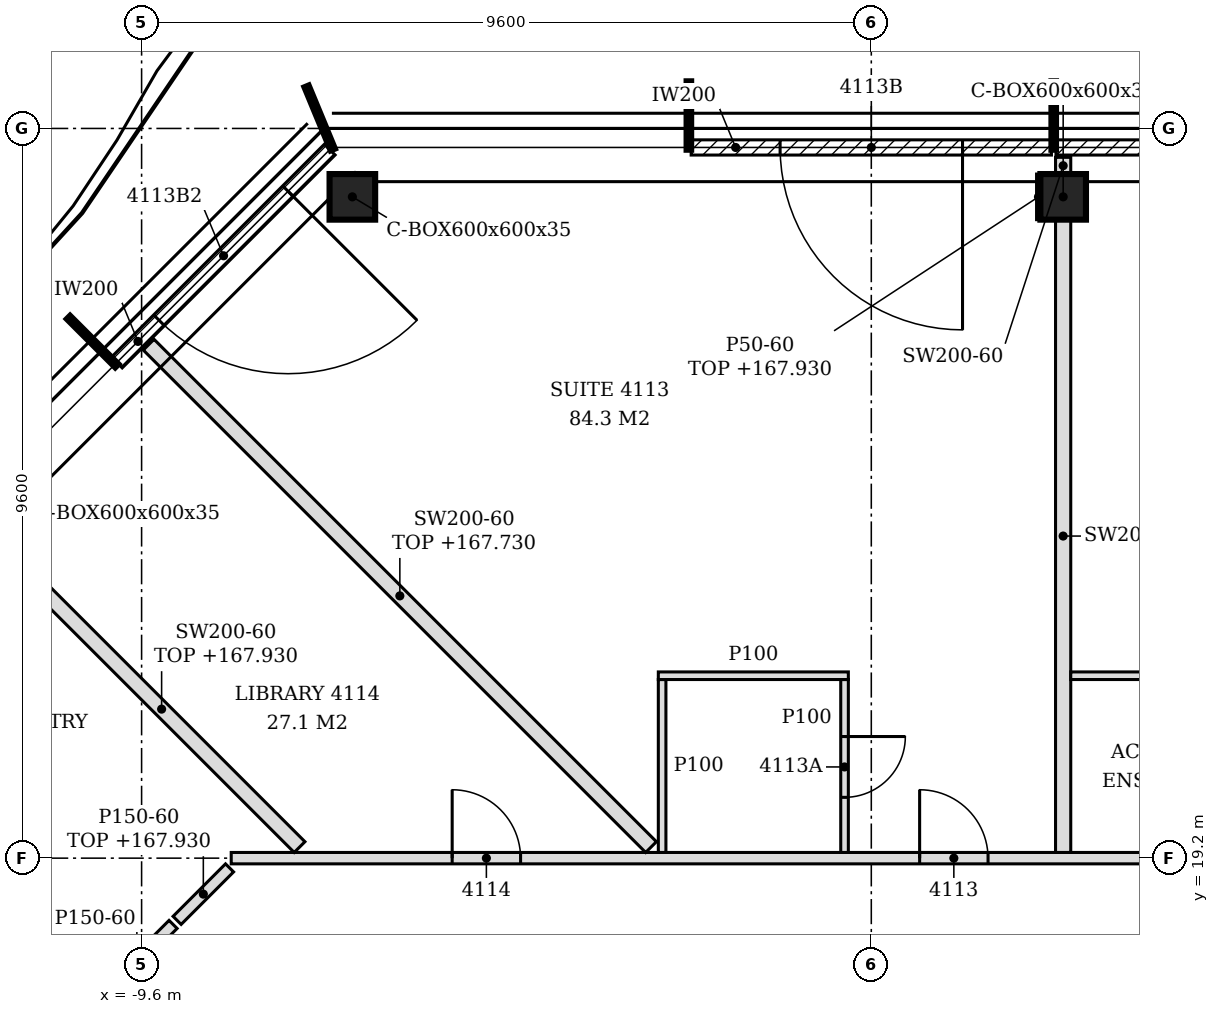
"""IFC4 building model, lengths in metres.
Left out: names, types, materials, properties, quantities, classifications, styles, units other than length and angle.
Written with IfcOpenShell. Run it as: python <this file> out.ifc"""

import sys

from ifc_helpers import new_model, si_unit, direction, frame, frame_2d, origin, origin_2d, place, context, subcontext, project, spatial, polyline, rectangle, hollow_rectangle, outline, extrude, element, fill, save


model = new_model("IFC4")
c1 = context("Model", 3, precision=1e-05, world=origin(), true_north=direction((0.0, 1.0)))
c2 = subcontext(c1, "Body", "Model", "MODEL_VIEW")
j1 = project(units=[si_unit("LENGTHUNIT", "METRE"), si_unit("PLANEANGLEUNIT", "RADIAN")], contexts=[c1])
p1 = place(None, origin())
s1 = spatial("IfcSite", under=j1, at=p1, CompositionType="ELEMENT")
p2 = place(p1, origin())
s2 = spatial("IfcBuilding", under=s1, at=p2, CompositionType="ELEMENT")
p3 = place(p2, frame((0.0, 0.0, 165.0)))
s3 = spatial("IfcBuildingStorey", under=s2, at=p3, CompositionType="ELEMENT", Elevation=165.0)
for number, where, z_axis, x_axis in (
    (1, (2.524, 27.9, -0.15), (0.0, 0.0, 1.0), (1.0, 0.0, 0.0)),
    (2, (-6.827, 27.9, -0.15), (0.0, 0.0, 1.0), (1.0, 0.0, 0.0)),
):
    element("IfcColumn", number, at=place(p3, frame(where, z_axis=z_axis, x_axis=x_axis)), inside=s3, PredefinedType="COLUMN", context=c2, shape_type="SweptSolid", body=[
        extrude(hollow_rectangle(XDim=0.6, YDim=0.6, WallThickness=0.035, at=origin_2d()), origin(), (0.0, 0.0, 1.0), 3.6),
    ])
p4 = place(p3, frame((7.17, 28.55, 0.0), z_axis=(0.0, 0.0, 1.0), x_axis=(-1.0, 0.0, 0.0)))
e3 = element("IfcWall", 3, at=p4, inside=s3, PredefinedType="NOTDEFINED", context=c2, shape_type="SweptSolid", body=[
    extrude(rectangle(XDim=4.74, YDim=0.2, at=frame_2d((2.37, 0.0))), origin(), (0.0, 0.0, 1.0), 3.45),
])
p5 = place(p4, frame((1.17, 0.0, 0.0)))
e4 = element("IfcOpeningElement", 4, at=p5, cuts=e3, PredefinedType="OPENING", context=c2, shape_type="SweptSolid", body=[
    extrude(rectangle(XDim=2.4, YDim=2.4, at=frame_2d((1.2, 1.2))), frame((0.0, 0.11, 0.0), z_axis=(0.0, -1.0, 0.0), x_axis=(1.0, 0.0, 0.0)), (0.0, 0.0, 1.0), 0.22),
])
p6 = place(p3, frame((2.37, 28.55, 0.0), z_axis=(0.0, 0.0, 1.0), x_axis=(-1.0, 0.0, 0.0)))
e5 = element("IfcWall", 5, at=p6, inside=s3, PredefinedType="NOTDEFINED", context=c2, shape_type="SweptSolid", body=[
    extrude(rectangle(XDim=4.74, YDim=0.2, at=frame_2d((2.37, 0.0))), origin(), (0.0, 0.0, 1.0), 3.45),
])
p7 = place(p6, frame((1.17, 0.0, 0.0)))
e6 = element("IfcOpeningElement", 6, at=p7, cuts=e5, PredefinedType="OPENING", context=c2, shape_type="SweptSolid", body=[
    extrude(rectangle(XDim=2.4, YDim=2.4, at=frame_2d((1.2, 1.2))), frame((0.0, 0.11, 0.0), z_axis=(0.0, -1.0, 0.0), x_axis=(1.0, 0.0, 0.0)), (0.0, 0.0, 1.0), 0.22),
])
p8 = place(p3, frame((-7.125, 28.522, 0.0), z_axis=(0.0, 0.0, 1.0), x_axis=(-0.707106781187, -0.707106781187, 0.0)))
e7 = element("IfcWall", 7, at=p8, inside=s3, PredefinedType="NOTDEFINED", context=c2, shape_type="SweptSolid", body=[
    extrude(rectangle(XDim=3.962, YDim=0.2, at=frame_2d((1.981, 0.0))), origin(), (0.0, 0.0, 1.0), 3.45),
])
p9 = place(p8, frame((0.775, 0.0, 0.0)))
e8 = element("IfcOpeningElement", 8, at=p9, cuts=e7, PredefinedType="OPENING", context=c2, shape_type="SweptSolid", body=[
    extrude(rectangle(XDim=2.4, YDim=2.4, at=frame_2d((1.2, 1.2))), frame((0.0, 0.11, 0.0), z_axis=(0.0, -1.0, 0.0), x_axis=(1.0, 0.0, 0.0)), (0.0, 0.0, 1.0), 0.22),
])
p10 = place(p3, frame((-11.357, 16.157, 0.0), z_axis=(0.0, 0.0, 1.0), x_axis=(0.707106781187, 0.707106781187, 0.0)))
e9 = element("IfcWall", 9, at=p10, inside=s3, PredefinedType="PARTITIONING", context=c2, shape_type="SweptSolid", body=[
    extrude(rectangle(XDim=3.071, YDim=0.15, at=frame_2d((1.535, 0.0))), origin(), (0.0, 0.0, 1.0), 3.45),
])
p11 = place(p10, frame((0.823, 0.0, 0.0)))
e10 = element("IfcOpeningElement", 10, at=p11, cuts=e9, PredefinedType="OPENING", context=c2, shape_type="SweptSolid", body=[
    extrude(rectangle(XDim=0.9, YDim=2.1, at=frame_2d((0.45, 1.05))), frame((0.0, 0.085, 0.0), z_axis=(0.0, -1.0, 0.0), x_axis=(1.0, 0.0, 0.0)), (0.0, 0.0, 1.0), 0.17),
])
p12 = place(p3, frame((-9.133, 18.381, 0.0), z_axis=(0.0, 0.0, 1.0), x_axis=(0.706731558776, 0.707481804593, 0.0)))
e11 = element("IfcWall", 11, at=p12, inside=s3, PredefinedType="PARTITIONING", context=c2, shape_type="SweptSolid", body=[
    extrude(rectangle(XDim=0.976, YDim=0.15, at=frame_2d((0.488, 0.0))), origin(), (0.0, 0.0, 1.0), 2.93),
])
p13 = place(p3, frame((-8.421, 19.2, 0.0), z_axis=(0.0, 0.0, 1.0), x_axis=(1.0, 0.0, 0.0)))
e12 = element("IfcWall", 12, at=p13, inside=s3, PredefinedType="PARTITIONING", context=c2, shape_type="SweptSolid", body=[
    extrude(outline(polyline([(0.0, 0.0), (31.242, 0.0), (31.242, 2.88), (27.771, 2.88), (27.769, 2.73), (27.471, 2.73), (27.469, 2.88), (15.771, 2.88), (15.769, 2.73), (15.471, 2.73), (15.469, 2.88), (3.771, 2.88), (3.769, 2.73), (3.471, 2.73), (3.469, 2.88), (0.0, 2.88), (0.0, 0.0)])), frame((0.0, 0.075, 0.0), z_axis=(0.0, -1.0, 0.0), x_axis=(1.0, 0.0, 0.0)), (0.0, 0.0, 1.0), 0.15),
])
p14 = place(p13, frame((25.997, 0.0, 0.0)))
e13 = element("IfcOpeningElement", 13, at=p14, cuts=e12, PredefinedType="OPENING", context=c2, shape_type="SweptSolid", body=[
    extrude(rectangle(XDim=0.9, YDim=2.1, at=frame_2d((0.45, 1.05))), frame((0.0, 0.085, 0.0), z_axis=(0.0, -1.0, 0.0), x_axis=(1.0, 0.0, 0.0)), (0.0, 0.0, 1.0), 0.17),
])
p15 = place(p13, frame((17.93, 0.0, 0.0)))
e14 = element("IfcOpeningElement", 14, at=p15, cuts=e12, PredefinedType="OPENING", context=c2, shape_type="SweptSolid", body=[
    extrude(rectangle(XDim=0.9, YDim=2.1, at=frame_2d((0.45, 1.05))), frame((0.0, 0.085, 0.0), z_axis=(0.0, -1.0, 0.0), x_axis=(1.0, 0.0, 0.0)), (0.0, 0.0, 1.0), 0.17),
])
p16 = place(p13, frame((14.754, 0.0, 0.0)))
e15 = element("IfcOpeningElement", 15, at=p16, cuts=e12, PredefinedType="OPENING", context=c2, shape_type="SweptSolid", body=[
    extrude(rectangle(XDim=0.9, YDim=2.1, at=frame_2d((0.45, 1.05))), frame((0.0, 0.085, 0.0), z_axis=(0.0, -1.0, 0.0), x_axis=(1.0, 0.0, 0.0)), (0.0, 0.0, 1.0), 0.17),
])
p17 = place(p13, frame((9.057, 0.0, 0.0)))
e16 = element("IfcOpeningElement", 16, at=p17, cuts=e12, PredefinedType="OPENING", context=c2, shape_type="SweptSolid", body=[
    extrude(rectangle(XDim=0.9, YDim=2.1, at=frame_2d((0.45, 1.05))), frame((0.0, 0.085, 0.0), z_axis=(0.0, -1.0, 0.0), x_axis=(1.0, 0.0, 0.0)), (0.0, 0.0, 1.0), 0.17),
])
p18 = place(p13, frame((2.907, 0.0, 0.0)))
e17 = element("IfcOpeningElement", 17, at=p18, cuts=e12, PredefinedType="OPENING", context=c2, shape_type="SweptSolid", body=[
    extrude(rectangle(XDim=0.9, YDim=2.1, at=frame_2d((0.45, 1.05))), frame((0.0, 0.085, 0.0), z_axis=(0.0, -1.0, 0.0), x_axis=(1.0, 0.0, 0.0)), (0.0, 0.0, 1.0), 0.17),
])
p19 = place(p3, frame((-7.522, 19.346, 0.0), z_axis=(0.0, 0.0, 1.0), x_axis=(-0.707106781187, 0.707106781187, 0.0)))
e18 = element("IfcWall", 18, at=p19, inside=s3, PredefinedType="PARTITIONING", context=c2, shape_type="SweptSolid", body=[
    extrude(rectangle(XDim=5.134, YDim=0.2, at=frame_2d((2.567, 0.0))), origin(), (0.0, 0.0, 1.0), 2.93),
])
p20 = place(p3, frame((-2.898, 19.346, 0.0), z_axis=(0.0, 0.0, 1.0), x_axis=(-0.707106781187, 0.707106781187, 0.0)))
e19 = element("IfcWall", 19, at=p20, inside=s3, PredefinedType="PARTITIONING", context=c2, shape_type="SweptSolid", body=[
    extrude(rectangle(XDim=9.347, YDim=0.2, at=frame_2d((4.674, 0.0))), origin(), (0.0, 0.0, 1.0), 2.73),
])
p21 = place(p3, frame((-2.752, 19.275, 0.0), z_axis=(0.0, 0.0, 1.0), x_axis=(0.0, 1.0, 0.0)))
e20 = element("IfcWall", 20, at=p21, inside=s3, PredefinedType="PARTITIONING", context=c2, shape_type="SweptSolid", body=[
    extrude(outline(polyline([(0.0, 0.0), (2.275, 0.0), (2.275, 3.45), (0.03, 3.45), (0.028, 2.88), (0.0, 2.88), (0.0, 0.0)])), frame((0.0, 0.05, 0.0), z_axis=(0.0, -1.0, 0.0), x_axis=(1.0, 0.0, 0.0)), (0.0, 0.0, 1.0), 0.1),
])
p22 = place(p3, frame((-0.352, 19.275, 0.0), z_axis=(0.0, 0.0, 1.0), x_axis=(0.0, 1.0, 0.0)))
e21 = element("IfcWall", 21, at=p22, inside=s3, PredefinedType="PARTITIONING", context=c2, shape_type="SweptSolid", body=[
    extrude(outline(polyline([(0.0, 0.0), (2.275, 0.0), (2.275, 3.45), (0.03, 3.45), (0.028, 2.88), (0.0, 2.88), (0.0, 0.0)])), frame((0.0, 0.05, 0.0), z_axis=(0.0, -1.0, 0.0), x_axis=(1.0, 0.0, 0.0)), (0.0, 0.0, 1.0), 0.1),
])
p23 = place(p22, frame((0.725, 0.0, 0.0)))
e22 = element("IfcOpeningElement", 22, at=p23, cuts=e21, PredefinedType="OPENING", context=c2, shape_type="SweptSolid", body=[
    extrude(rectangle(XDim=0.8, YDim=2.1, at=frame_2d((0.4, 1.05))), frame((0.0, 0.06, 0.0), z_axis=(0.0, -1.0, 0.0), x_axis=(1.0, 0.0, 0.0)), (0.0, 0.0, 1.0), 0.12),
])
p24 = place(p3, frame((2.524, 19.275, 0.0), z_axis=(0.0, 0.0, 1.0), x_axis=(0.0, 1.0, 0.0)))
e23 = element("IfcWall", 23, at=p24, inside=s3, PredefinedType="PARTITIONING", context=c2, shape_type="SweptSolid", body=[
    extrude(outline(polyline([(0.0, 0.0), (8.325, 0.0), (8.325, 3.45), (4.83, 3.45), (4.828, 2.88), (4.62, 2.88), (4.618, 3.45), (0.03, 3.45), (0.028, 2.88), (0.0, 2.88), (0.0, 0.0)])), frame((0.0, 0.1, 0.0), z_axis=(0.0, -1.0, 0.0), x_axis=(1.0, 0.0, 0.0)), (0.0, 0.0, 1.0), 0.2),
])
p25 = place(p3, frame((-2.802, 21.6, 0.0), z_axis=(0.0, 0.0, 1.0), x_axis=(1.0, 0.0, 0.0)))
e24 = element("IfcWall", 24, at=p25, inside=s3, PredefinedType="PARTITIONING", context=c2, shape_type="SweptSolid", body=[
    extrude(rectangle(XDim=2.5, YDim=0.1, at=frame_2d((1.25, 0.0))), origin(), (0.0, 0.0, 1.0), 3.45),
])
p26 = place(p3, frame((2.624, 21.6, 0.0), z_axis=(0.0, 0.0, 1.0), x_axis=(1.0, 0.0, 0.0)))
e25 = element("IfcWall", 25, at=p26, inside=s3, PredefinedType="PARTITIONING", context=c2, shape_type="SweptSolid", body=[
    extrude(rectangle(XDim=2.95, YDim=0.1, at=frame_2d((1.475, 0.0))), origin(), (0.0, 0.0, 1.0), 3.45),
])
p27 = place(p26, frame((0.95, 0.0, 0.0)))
e26 = element("IfcOpeningElement", 26, at=p27, cuts=e25, PredefinedType="OPENING", context=c2, shape_type="SweptSolid", body=[
    extrude(rectangle(XDim=0.9, YDim=2.1, at=frame_2d((0.45, 1.05))), frame((0.0, 0.06, 0.0), z_axis=(0.0, -1.0, 0.0), x_axis=(1.0, 0.0, 0.0)), (0.0, 0.0, 1.0), 0.12),
])
p28 = place(p3, frame((2.524, 28.2, 0.0), z_axis=(0.0, 0.0, 1.0), x_axis=(0.0, 1.0, 0.0)))
e27 = element("IfcWall", 27, at=p28, inside=s3, PredefinedType="PARTITIONING", context=c2, shape_type="SweptSolid", body=[
    extrude(rectangle(XDim=0.22, YDim=0.2, at=frame_2d((0.11, 0.0))), origin(), (0.0, 0.0, 1.0), 3.45),
])
p29 = place(p3, frame((2.199, 27.6, 0.0), z_axis=(0.0, 0.0, 1.0), x_axis=(0.0, 1.0, 0.0)))
e28 = element("IfcWall", 28, at=p29, inside=s3, PredefinedType="PARTITIONING", context=c2, shape_type="SweptSolid", body=[
    extrude(rectangle(XDim=0.6, YDim=0.05, at=frame_2d((0.3, 0.0))), origin(), (0.0, 0.0, 1.0), 2.93),
])
p30 = place(p7, origin())
e29 = element("IfcDoor", 29, at=p30, inside=s3, OperationType="SINGLE_SWING_LEFT", PredefinedType="DOOR", context=c2, shape_type="SweptSolid", body=[
    extrude(rectangle(XDim=2.4, YDim=2.4, at=frame_2d((1.2, 1.2))), frame((0.0, 0.025, 0.0), z_axis=(0.0, -1.0, 0.0), x_axis=(1.0, 0.0, 0.0)), (0.0, 0.0, 1.0), 0.05),
])
fill(e6, e29)
p31 = place(p9, origin())
e30 = element("IfcDoor", 30, at=p31, inside=s3, OperationType="SINGLE_SWING_LEFT", PredefinedType="DOOR", context=c2, shape_type="SweptSolid", body=[
    extrude(rectangle(XDim=2.4, YDim=2.4, at=frame_2d((1.2, 1.2))), frame((0.0, 0.025, 0.0), z_axis=(0.0, -1.0, 0.0), x_axis=(1.0, 0.0, 0.0)), (0.0, 0.0, 1.0), 0.05),
])
fill(e8, e30)
p32 = place(p17, origin())
e31 = element("IfcDoor", 31, at=p32, inside=s3, OperationType="SINGLE_SWING_LEFT", PredefinedType="DOOR", context=c2, shape_type="SweptSolid", body=[
    extrude(rectangle(XDim=0.9, YDim=2.1, at=frame_2d((0.45, 1.05))), frame((0.0, 0.025, 0.0), z_axis=(0.0, -1.0, 0.0), x_axis=(1.0, 0.0, 0.0)), (0.0, 0.0, 1.0), 0.05),
])
fill(e16, e31)
p33 = place(p23, frame((0.8, 0.0, 0.0), z_axis=(0.0, 0.0, 1.0), x_axis=(-1.0, 0.0, 0.0)))
e32 = element("IfcDoor", 32, at=p33, inside=s3, OperationType="SINGLE_SWING_LEFT", PredefinedType="DOOR", context=c2, shape_type="SweptSolid", body=[
    extrude(rectangle(XDim=0.8, YDim=2.1, at=frame_2d((0.4, 1.05))), frame((0.0, 0.025, 0.0), z_axis=(0.0, -1.0, 0.0), x_axis=(1.0, 0.0, 0.0)), (0.0, 0.0, 1.0), 0.05),
])
fill(e22, e32)
p34 = place(p18, origin())
e33 = element("IfcDoor", 33, at=p34, inside=s3, OperationType="SINGLE_SWING_LEFT", PredefinedType="DOOR", context=c2, shape_type="SweptSolid", body=[
    extrude(rectangle(XDim=0.9, YDim=2.1, at=frame_2d((0.45, 1.05))), frame((0.0, 0.025, 0.0), z_axis=(0.0, -1.0, 0.0), x_axis=(1.0, 0.0, 0.0)), (0.0, 0.0, 1.0), 0.05),
])
fill(e17, e33)
save(model, sys.argv[1])
